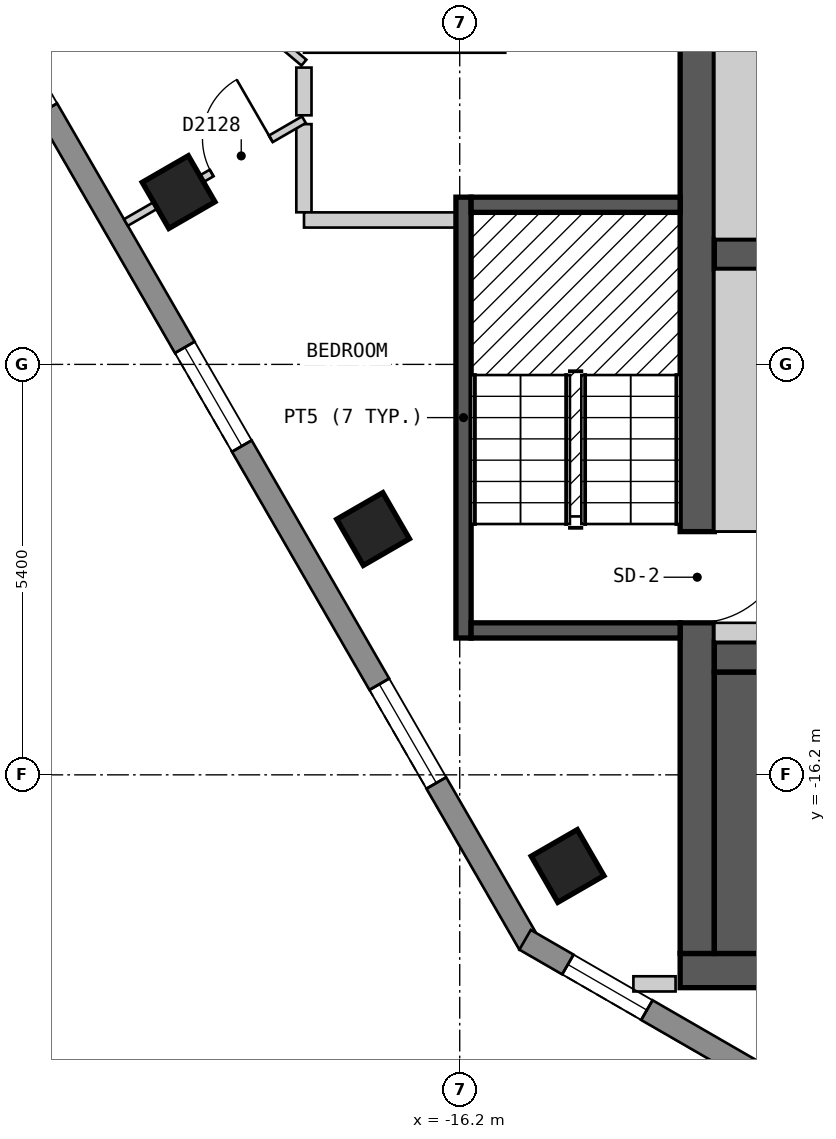
"""IFC4 building model, lengths in metres.
Left out: names, types, materials, properties, quantities, classifications, styles, units other than length and angle.
Written with IfcOpenShell. Run it as: python <this file> out.ifc"""

import sys

from ifc_helpers import new_model, si_unit, direction, frame, frame_2d, origin, origin_2d, place, context, subcontext, project, spatial, polyline, rectangle, outline, extrude, element, fill, save


model = new_model("IFC4")
c1 = context("Model", 3, precision=1e-05, world=origin(), true_north=direction((0.0, 1.0)))
c2 = subcontext(c1, "Body", "Model", "MODEL_VIEW")
j1 = project(units=[si_unit("LENGTHUNIT", "METRE"), si_unit("PLANEANGLEUNIT", "RADIAN")], contexts=[c1])
p1 = place(None, origin())
s1 = spatial("IfcSite", under=j1, at=p1, CompositionType="ELEMENT")
p2 = place(p1, origin())
s2 = spatial("IfcBuilding", under=s1, at=p2, CompositionType="ELEMENT")
p3 = place(p2, frame((0.0, 0.0, 217.8)))
s3 = spatial("IfcBuildingStorey", under=s2, at=p3, CompositionType="ELEMENT", Elevation=217.8)
for number, where, z_axis, x_axis in (
    (1, (-19.899, -8.533, 0.0), (0.0, 0.0, 1.0), (0.5, -0.866, 0.0)),
    (2, (-17.34, -12.966, 0.0), (0.0, 0.0, 1.0), (0.5, -0.866, 0.0)),
    (3, (-14.781, -17.399, 0.0), (0.0, 0.0, 1.0), (0.5, -0.866, 0.0)),
):
    element("IfcColumn", number, at=place(p3, frame(where, z_axis=z_axis, x_axis=x_axis)), inside=s3, PredefinedType="COLUMN", context=c2, shape_type="SweptSolid", body=[
        extrude(rectangle(XDim=0.7, YDim=0.7, at=origin_2d()), origin(), (0.0, 0.0, 1.0), 3.0),
    ])
p4 = place(p3, frame((-13.3, -18.775, 0.0), z_axis=(0.0, 0.0, 1.0), x_axis=(1.0, 0.0, 0.0)))
e4 = element("IfcWall", 4, at=p4, inside=s3, PredefinedType="SHEAR", context=c2, shape_type="SweptSolid", body=[
    extrude(rectangle(XDim=26.6, YDim=0.45, at=frame_2d((13.3, 0.0))), origin(), (0.0, 0.0, 1.0), 2.7),
])
p5 = place(p4, frame((9.3, 0.0, 0.0)))
e5 = element("IfcOpeningElement", 5, at=p5, cuts=e4, PredefinedType="OPENING", context=c2, shape_type="SweptSolid", body=[
    extrude(rectangle(XDim=0.9, YDim=2.1, at=frame_2d((0.45, 1.05))), frame((0.0, 0.235, 0.0), z_axis=(0.0, -1.0, 0.0), x_axis=(1.0, 0.0, 0.0)), (0.0, 0.0, 1.0), 0.47),
])
p6 = place(p3, frame((-13.075, -18.55, 0.0), z_axis=(0.0, 0.0, 1.0), x_axis=(0.0, 1.0, 0.0)))
e6 = element("IfcWall", 6, at=p6, inside=s3, PredefinedType="SHEAR", context=c2, shape_type="SweptSolid", body=[
    extrude(rectangle(XDim=13.1, YDim=0.45, at=frame_2d((6.55, 0.0))), origin(), (0.0, 0.0, 1.0), 2.7),
])
p7 = place(p6, frame((4.35, 0.0, 0.0)))
e7 = element("IfcOpeningElement", 7, at=p7, cuts=e6, PredefinedType="OPENING", context=c2, shape_type="SweptSolid", body=[
    extrude(rectangle(XDim=1.2, YDim=2.1, at=frame_2d((0.6, 1.05))), frame((0.0, 0.235, 0.0), z_axis=(0.0, -1.0, 0.0), x_axis=(1.0, 0.0, 0.0)), (0.0, 0.0, 1.0), 0.47),
])
p8 = place(p3, frame((-12.85, -14.65, 0.0), z_axis=(0.0, 0.0, 1.0), x_axis=(1.0, 0.0, 0.0)))
e8 = element("IfcWall", 8, at=p8, inside=s3, PredefinedType="SHEAR", context=c2, shape_type="SweptSolid", body=[
    extrude(rectangle(XDim=25.7, YDim=0.4, at=frame_2d((12.85, 0.0))), origin(), (0.0, 0.0, 1.0), 2.7),
])
p9 = place(p8, frame((2.05, 0.0, 0.0), z_axis=(0.0, 0.0, 1.0), x_axis=(-1.0, 0.0, 0.0)))
e9 = element("IfcOpeningElement", 9, at=p9, cuts=e8, PredefinedType="OPENING", context=c2, shape_type="SweptSolid", body=[
    extrude(rectangle(XDim=1.2, YDim=2.1, at=frame_2d((0.6, 1.05))), frame((0.0, 0.21, 0.0), z_axis=(0.0, -1.0, 0.0), x_axis=(1.0, 0.0, 0.0)), (0.0, 0.0, 1.0), 0.42),
])
p10 = place(p8, frame((24.9, 0.0, 0.0), z_axis=(0.0, 0.0, 1.0), x_axis=(-1.0, 0.0, 0.0)))
e10 = element("IfcOpeningElement", 10, at=p10, cuts=e8, PredefinedType="OPENING", context=c2, shape_type="SweptSolid", body=[
    extrude(rectangle(XDim=1.2, YDim=2.1, at=frame_2d((0.6, 1.05))), frame((0.0, 0.21, 0.0), z_axis=(0.0, -1.0, 0.0), x_axis=(1.0, 0.0, 0.0)), (0.0, 0.0, 1.0), 0.42),
])
p11 = place(p8, frame((8.75, 0.0, 0.0), z_axis=(0.0, 0.0, 1.0), x_axis=(-1.0, 0.0, 0.0)))
e11 = element("IfcOpeningElement", 11, at=p11, cuts=e8, PredefinedType="OPENING", context=c2, shape_type="SweptSolid", body=[
    extrude(rectangle(XDim=1.0, YDim=2.1, at=frame_2d((0.5, 1.05))), frame((0.0, 0.21, 0.0), z_axis=(0.0, -1.0, 0.0), x_axis=(1.0, 0.0, 0.0)), (0.0, 0.0, 1.0), 0.42),
])
p12 = place(p8, frame((11.5, 0.0, 0.0), z_axis=(0.0, 0.0, 1.0), x_axis=(-1.0, 0.0, 0.0)))
e12 = element("IfcOpeningElement", 12, at=p12, cuts=e8, PredefinedType="OPENING", context=c2, shape_type="SweptSolid", body=[
    extrude(rectangle(XDim=0.9, YDim=2.1, at=frame_2d((0.45, 1.05))), frame((0.0, 0.21, 0.0), z_axis=(0.0, -1.0, 0.0), x_axis=(1.0, 0.0, 0.0)), (0.0, 0.0, 1.0), 0.42),
])
p13 = place(p8, frame((14.3, 0.0, 0.0), z_axis=(0.0, 0.0, 1.0), x_axis=(-1.0, 0.0, 0.0)))
e13 = element("IfcOpeningElement", 13, at=p13, cuts=e8, PredefinedType="OPENING", context=c2, shape_type="SweptSolid", body=[
    extrude(rectangle(XDim=1.0, YDim=2.1, at=frame_2d((0.5, 1.05))), frame((0.0, 0.21, 0.0), z_axis=(0.0, -1.0, 0.0), x_axis=(1.0, 0.0, 0.0)), (0.0, 0.0, 1.0), 0.42),
])
p14 = place(p8, frame((17.9, 0.0, 0.0), z_axis=(0.0, 0.0, 1.0), x_axis=(-1.0, 0.0, 0.0)))
e14 = element("IfcOpeningElement", 14, at=p14, cuts=e8, PredefinedType="OPENING", context=c2, shape_type="SweptSolid", body=[
    extrude(rectangle(XDim=1.0, YDim=2.1, at=frame_2d((0.5, 1.05))), frame((0.0, 0.21, 0.0), z_axis=(0.0, -1.0, 0.0), x_axis=(1.0, 0.0, 0.0)), (0.0, 0.0, 1.0), 0.42),
])
p15 = place(p3, frame((-12.85, -9.35, 0.0), z_axis=(0.0, 0.0, 1.0), x_axis=(1.0, 0.0, 0.0)))
e15 = element("IfcWall", 15, at=p15, inside=s3, PredefinedType="SHEAR", context=c2, shape_type="SweptSolid", body=[
    extrude(rectangle(XDim=23.05, YDim=0.4, at=frame_2d((11.525, 0.0))), origin(), (0.0, 0.0, 1.0), 2.7),
])
p16 = place(p15, frame((1.45, 0.0, 0.0)))
e16 = element("IfcOpeningElement", 16, at=p16, cuts=e15, PredefinedType="OPENING", context=c2, shape_type="SweptSolid", body=[
    extrude(rectangle(XDim=1.1, YDim=2.1, at=frame_2d((0.55, 1.05))), frame((0.0, 0.21, 0.0), z_axis=(0.0, -1.0, 0.0), x_axis=(1.0, 0.0, 0.0)), (0.0, 0.0, 1.0), 0.42),
])
p17 = place(p15, frame((4.25, 0.0, 0.0)))
e17 = element("IfcOpeningElement", 17, at=p17, cuts=e15, PredefinedType="OPENING", context=c2, shape_type="SweptSolid", body=[
    extrude(rectangle(XDim=1.1, YDim=2.1, at=frame_2d((0.55, 1.05))), frame((0.0, 0.21, 0.0), z_axis=(0.0, -1.0, 0.0), x_axis=(1.0, 0.0, 0.0)), (0.0, 0.0, 1.0), 0.42),
])
p18 = place(p15, frame((7.05, 0.0, 0.0)))
e18 = element("IfcOpeningElement", 18, at=p18, cuts=e15, PredefinedType="OPENING", context=c2, shape_type="SweptSolid", body=[
    extrude(rectangle(XDim=1.1, YDim=2.1, at=frame_2d((0.55, 1.05))), frame((0.0, 0.21, 0.0), z_axis=(0.0, -1.0, 0.0), x_axis=(1.0, 0.0, 0.0)), (0.0, 0.0, 1.0), 0.42),
])
p19 = place(p15, frame((9.35, 0.0, 0.0)))
e19 = element("IfcOpeningElement", 19, at=p19, cuts=e15, PredefinedType="OPENING", context=c2, shape_type="SweptSolid", body=[
    extrude(rectangle(XDim=1.1, YDim=2.1, at=frame_2d((0.55, 1.05))), frame((0.0, 0.21, 0.0), z_axis=(0.0, -1.0, 0.0), x_axis=(1.0, 0.0, 0.0)), (0.0, 0.0, 1.0), 0.42),
])
p20 = place(p15, frame((11.65, 0.0, 0.0)))
e20 = element("IfcOpeningElement", 20, at=p20, cuts=e15, PredefinedType="OPENING", context=c2, shape_type="SweptSolid", body=[
    extrude(rectangle(XDim=1.1, YDim=2.1, at=frame_2d((0.55, 1.05))), frame((0.0, 0.21, 0.0), z_axis=(0.0, -1.0, 0.0), x_axis=(1.0, 0.0, 0.0)), (0.0, 0.0, 1.0), 0.42),
])
p21 = place(p15, frame((13.95, 0.0, 0.0)))
e21 = element("IfcOpeningElement", 21, at=p21, cuts=e15, PredefinedType="OPENING", context=c2, shape_type="SweptSolid", body=[
    extrude(rectangle(XDim=1.1, YDim=2.1, at=frame_2d((0.55, 1.05))), frame((0.0, 0.21, 0.0), z_axis=(0.0, -1.0, 0.0), x_axis=(1.0, 0.0, 0.0)), (0.0, 0.0, 1.0), 0.42),
])
p22 = place(p15, frame((16.25, 0.0, 0.0)))
e22 = element("IfcOpeningElement", 22, at=p22, cuts=e15, PredefinedType="OPENING", context=c2, shape_type="SweptSolid", body=[
    extrude(rectangle(XDim=1.1, YDim=2.1, at=frame_2d((0.55, 1.05))), frame((0.0, 0.21, 0.0), z_axis=(0.0, -1.0, 0.0), x_axis=(1.0, 0.0, 0.0)), (0.0, 0.0, 1.0), 0.42),
])
p23 = place(p15, frame((18.55, 0.0, 0.0)))
e23 = element("IfcOpeningElement", 23, at=p23, cuts=e15, PredefinedType="OPENING", context=c2, shape_type="SweptSolid", body=[
    extrude(rectangle(XDim=1.1, YDim=2.1, at=frame_2d((0.55, 1.05))), frame((0.0, 0.21, 0.0), z_axis=(0.0, -1.0, 0.0), x_axis=(1.0, 0.0, 0.0)), (0.0, 0.0, 1.0), 0.42),
])
p24 = place(p15, frame((20.95, 0.0, 0.0)))
e24 = element("IfcOpeningElement", 24, at=p24, cuts=e15, PredefinedType="OPENING", context=c2, shape_type="SweptSolid", body=[
    extrude(rectangle(XDim=1.1, YDim=2.1, at=frame_2d((0.55, 1.05))), frame((0.0, 0.21, 0.0), z_axis=(0.0, -1.0, 0.0), x_axis=(1.0, 0.0, 0.0)), (0.0, 0.0, 1.0), 0.42),
])
p25 = place(p3, frame((-23.599, -4.025, 0.0), z_axis=(0.0, 0.0, 1.0), x_axis=(0.500012653391, -0.866018098222, 0.0)))
e25 = element("IfcWall", 25, at=p25, inside=s3, PredefinedType="SOLIDWALL", context=c2, shape_type="SweptSolid", body=[
    extrude(outline(polyline([(0.0, -0.15), (16.628, -0.15), (16.548, 0.15), (0.08, 0.15), (0.0, -0.15)])), origin(), (0.0, 0.0, 1.0), 2.7),
])
p26 = place(p25, frame((2.444, 0.0, 0.15)))
e26 = element("IfcOpeningElement", 26, at=p26, cuts=e25, PredefinedType="OPENING", context=c2, shape_type="SweptSolid", body=[
    extrude(rectangle(XDim=1.5, YDim=2.1, at=frame_2d((0.75, 1.05))), frame((0.0, 0.16, 0.0), z_axis=(0.0, -1.0, 0.0), x_axis=(1.0, 0.0, 0.0)), (0.0, 0.0, 1.0), 0.32),
])
p27 = place(p25, frame((7.564, 0.0, 0.15)))
e27 = element("IfcOpeningElement", 27, at=p27, cuts=e25, PredefinedType="OPENING", context=c2, shape_type="SweptSolid", body=[
    extrude(rectangle(XDim=1.5, YDim=2.1, at=frame_2d((0.75, 1.05))), frame((0.0, 0.16, 0.0), z_axis=(0.0, -1.0, 0.0), x_axis=(1.0, 0.0, 0.0)), (0.0, 0.0, 1.0), 0.32),
])
p28 = place(p25, frame((12.682, 0.0, 0.15)))
e28 = element("IfcOpeningElement", 28, at=p28, cuts=e25, PredefinedType="OPENING", context=c2, shape_type="SweptSolid", body=[
    extrude(rectangle(XDim=1.5, YDim=2.1, at=frame_2d((0.75, 1.05))), frame((0.0, 0.16, 0.0), z_axis=(0.0, -1.0, 0.0), x_axis=(1.0, 0.0, 0.0)), (0.0, 0.0, 1.0), 0.32),
])
p29 = place(p3, frame((-15.34, -18.37, 0.0), z_axis=(0.0, 0.0, 1.0), x_axis=(0.866022959057, -0.500004234368, 0.0)))
e29 = element("IfcWall", 29, at=p29, inside=s3, PredefinedType="SOLIDWALL", context=c2, shape_type="SweptSolid", body=[
    extrude(outline(polyline([(0.0, -0.15), (5.0, -0.15), (4.92, 0.15), (0.08, 0.15), (0.0, -0.15)])), origin(), (0.0, 0.0, 1.0), 2.7),
])
p30 = place(p29, frame((0.65, 0.0, 0.15)))
e30 = element("IfcOpeningElement", 30, at=p30, cuts=e29, PredefinedType="OPENING", context=c2, shape_type="SweptSolid", body=[
    extrude(rectangle(XDim=1.2, YDim=2.1, at=frame_2d((0.6, 1.05))), frame((0.0, 0.16, 0.0), z_axis=(0.0, -1.0, 0.0), x_axis=(1.0, 0.0, 0.0)), (0.0, 0.0, 1.0), 0.32),
])
p31 = place(p3, frame((-18.25, -7.639, 0.0), z_axis=(0.0, 0.0, 1.0), x_axis=(0.0, -1.0, 0.0)))
e31 = element("IfcWall", 31, at=p31, inside=s3, PredefinedType="PARTITIONING", context=c2, shape_type="SweptSolid", body=[
    extrude(rectangle(XDim=1.16, YDim=0.2, at=frame_2d((0.58, 0.0))), origin(), (0.0, 0.0, 1.0), 2.7),
])
p32 = place(p3, frame((-18.249, -6.6, 0.0), z_axis=(0.0, 0.0, 1.0), x_axis=(1.0, 0.0, 0.0)))
e32 = element("IfcWall", 32, at=p32, inside=s3, PredefinedType="PARTITIONING", context=c2, shape_type="SweptSolid", body=[
    extrude(rectangle(XDim=2.648, YDim=0.2, at=frame_2d((1.324, 0.0))), origin(), (0.0, 0.0, 1.0), 2.7),
])
p33 = place(p3, frame((-18.249, -8.9, 0.0), z_axis=(0.0, 0.0, 1.0), x_axis=(1.0, 0.0, 0.0)))
e33 = element("IfcWall", 33, at=p33, inside=s3, PredefinedType="PARTITIONING", context=c2, shape_type="SweptSolid", body=[
    extrude(rectangle(XDim=2.199, YDim=0.2, at=frame_2d((1.1, 0.0))), origin(), (0.0, 0.0, 1.0), 2.7),
])
p34 = place(p3, frame((-18.25, -7.523, 0.0), z_axis=(0.0, 0.0, 1.0), x_axis=(0.0, 1.0, 0.0)))
e34 = element("IfcWall", 34, at=p34, inside=s3, PredefinedType="PARTITIONING", context=c2, shape_type="SweptSolid", body=[
    extrude(rectangle(XDim=0.628, YDim=0.2, at=frame_2d((0.314, 0.0))), origin(), (0.0, 0.0, 1.0), 2.7),
])
p35 = place(p3, frame((-20.15, -5.223, 0.0), z_axis=(0.0, 0.0, 1.0), x_axis=(0.763471868926, -0.645841083672, 0.0)))
e35 = element("IfcWall", 35, at=p35, inside=s3, PredefinedType="PARTITIONING", context=c2, shape_type="SweptSolid", body=[
    extrude(rectangle(XDim=2.489, YDim=0.1, at=frame_2d((1.244, 0.0))), origin(), (0.0, 0.0, 1.0), 2.7),
])
p36 = place(p3, frame((-20.592, -8.933, 0.0), z_axis=(0.0, 0.0, 1.0), x_axis=(0.866045775131, 0.499964714133, 0.0)))
e36 = element("IfcWall", 36, at=p36, inside=s3, PredefinedType="PARTITIONING", context=c2, shape_type="SweptSolid", body=[
    extrude(rectangle(XDim=2.704, YDim=0.1, at=frame_2d((1.352, 0.0))), origin(), (0.0, 0.0, 1.0), 2.7),
])
p37 = place(p36, frame((1.302, 0.0, 0.0)))
e37 = element("IfcOpeningElement", 37, at=p37, cuts=e36, PredefinedType="OPENING", context=c2, shape_type="SweptSolid", body=[
    extrude(rectangle(XDim=0.9, YDim=2.1, at=frame_2d((0.45, 1.05))), frame((0.0, 0.06, 0.0), z_axis=(0.0, -1.0, 0.0), x_axis=(1.0, 0.0, 0.0)), (0.0, 0.0, 1.0), 0.12),
])
p38 = place(p3, frame((-13.915, -18.95, 0.0), z_axis=(0.0, 0.0, 1.0), x_axis=(1.0, 0.0, 0.0)))
e38 = element("IfcWall", 38, at=p38, inside=s3, PredefinedType="PARTITIONING", context=c2, shape_type="SweptSolid", body=[
    extrude(rectangle(XDim=0.555, YDim=0.2, at=frame_2d((0.277, 0.0))), origin(), (0.0, 0.0, 1.0), 2.7),
])
p39 = place(p3, frame((-16.15, -14.4, 0.0), z_axis=(0.0, 0.0, 1.0), x_axis=(0.0, 1.0, 0.0)))
e39 = element("IfcWall", 39, at=p39, inside=s3, PredefinedType="SOLIDWALL", context=c2, shape_type="SweptSolid", body=[
    extrude(rectangle(XDim=5.8, YDim=0.2, at=frame_2d((2.9, 0.0))), origin(), (0.0, 0.0, 1.0), 2.7),
])
for number, where, z_axis, x_axis in (
    (40, (-16.05, -14.3, 0.0), (0.0, 0.0, 1.0), (1.0, 0.0, 0.0)),
    (41, (-16.05, -8.7, 0.0), (0.0, 0.0, 1.0), (1.0, 0.0, 0.0)),
):
    element("IfcWall", number, at=place(p3, frame(where, z_axis=z_axis, x_axis=x_axis)), inside=s3, PredefinedType="SOLIDWALL", context=c2, shape_type="SweptSolid", body=[
        extrude(rectangle(XDim=2.75, YDim=0.2, at=frame_2d((1.375, 0.0))), origin(), (0.0, 0.0, 1.0), 2.7),
    ])
p40 = place(p3, frame((-12.475, -18.55, 0.0), z_axis=(0.0, 0.0, 1.0), x_axis=(0.0, 1.0, 0.0)))
e42 = element("IfcWall", 42, at=p40, inside=s3, PredefinedType="SOLIDWALL", context=c2, shape_type="SweptSolid", body=[
    extrude(rectangle(XDim=3.7, YDim=0.75, at=frame_2d((1.85, 0.0))), origin(), (0.0, 0.0, 1.0), 2.7),
])
p41 = place(p3, frame((-12.85, -14.325, 0.0), z_axis=(0.0, 0.0, 1.0), x_axis=(1.0, 0.0, 0.0)))
e43 = element("IfcWall", 43, at=p41, inside=s3, PredefinedType="PARTITIONING", context=c2, shape_type="SweptSolid", body=[
    extrude(rectangle(XDim=0.75, YDim=0.25, at=frame_2d((0.375, 0.0))), origin(), (0.0, 0.0, 1.0), 2.7),
])
p42 = place(p3, frame((-12.475, -13.0, 0.0), z_axis=(0.0, 0.0, 1.0), x_axis=(0.0, 1.0, 0.0)))
e44 = element("IfcWall", 44, at=p42, inside=s3, PredefinedType="PARTITIONING", context=c2, shape_type="SweptSolid", body=[
    extrude(rectangle(XDim=3.45, YDim=0.75, at=frame_2d((1.725, 0.0))), origin(), (0.0, 0.0, 1.0), 2.7),
])
p43 = place(p3, frame((-12.475, -9.15, 0.0), z_axis=(0.0, 0.0, 1.0), x_axis=(0.0, 1.0, 0.0)))
e45 = element("IfcWall", 45, at=p43, inside=s3, PredefinedType="SOLIDWALL", context=c2, shape_type="SweptSolid", body=[
    extrude(rectangle(XDim=3.7, YDim=0.75, at=frame_2d((1.85, 0.0))), origin(), (0.0, 0.0, 1.0), 2.7),
])
p44 = place(p27, origin())
e46 = element("IfcWindow", 46, at=p44, inside=s3, PartitioningType="SINGLE_PANEL", PredefinedType="WINDOW", context=c2, shape_type="SweptSolid", body=[
    extrude(rectangle(XDim=1.5, YDim=2.1, at=frame_2d((0.75, 1.05))), frame((0.0, 0.03, 0.0), z_axis=(0.0, -1.0, 0.0), x_axis=(1.0, 0.0, 0.0)), (0.0, 0.0, 1.0), 0.06),
])
fill(e27, e46)
p45 = place(p28, origin())
e47 = element("IfcWindow", 47, at=p45, inside=s3, PartitioningType="SINGLE_PANEL", PredefinedType="WINDOW", context=c2, shape_type="SweptSolid", body=[
    extrude(rectangle(XDim=1.5, YDim=2.1, at=frame_2d((0.75, 1.05))), frame((0.0, 0.03, 0.0), z_axis=(0.0, -1.0, 0.0), x_axis=(1.0, 0.0, 0.0)), (0.0, 0.0, 1.0), 0.06),
])
fill(e28, e47)
p46 = place(p30, origin())
e48 = element("IfcWindow", 48, at=p46, inside=s3, PartitioningType="SINGLE_PANEL", PredefinedType="WINDOW", context=c2, shape_type="SweptSolid", body=[
    extrude(rectangle(XDim=1.2, YDim=2.1, at=frame_2d((0.6, 1.05))), frame((0.0, 0.03, 0.0), z_axis=(0.0, -1.0, 0.0), x_axis=(1.0, 0.0, 0.0)), (0.0, 0.0, 1.0), 0.06),
])
fill(e30, e48)
p47 = place(p37, origin())
e49 = element("IfcDoor", 49, at=p47, inside=s3, OperationType="SINGLE_SWING_RIGHT", PredefinedType="DOOR", context=c2, shape_type="SweptSolid", body=[
    extrude(rectangle(XDim=0.9, YDim=2.1, at=frame_2d((0.45, 1.05))), frame((0.0, 0.025, 0.0), z_axis=(0.0, -1.0, 0.0), x_axis=(1.0, 0.0, 0.0)), (0.0, 0.0, 1.0), 0.05),
])
fill(e37, e49)
p48 = place(p7, origin())
e50 = element("IfcDoor", 50, at=p48, inside=s3, OperationType="SINGLE_SWING_RIGHT", PredefinedType="DOOR", context=c2, shape_type="SweptSolid", body=[
    extrude(rectangle(XDim=1.2, YDim=2.1, at=frame_2d((0.6, 1.05))), frame((0.0, 0.025, 0.0), z_axis=(0.0, -1.0, 0.0), x_axis=(1.0, 0.0, 0.0)), (0.0, 0.0, 1.0), 0.05),
])
fill(e7, e50)
save(model, sys.argv[1])
